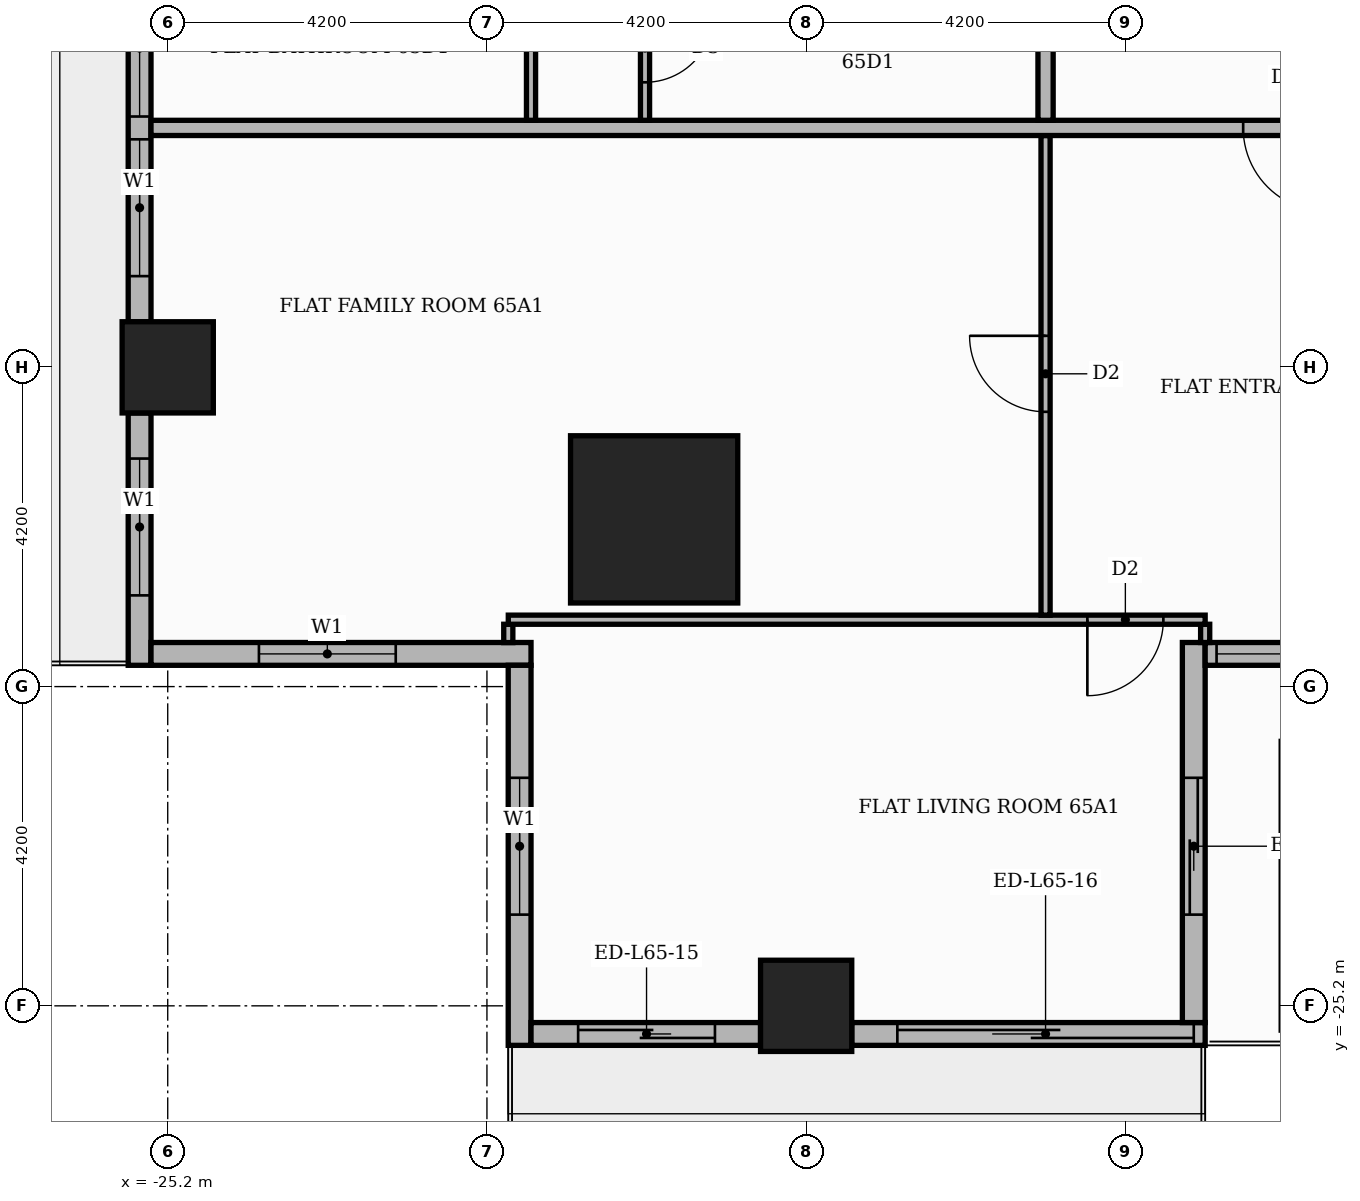
"""IFC4 building model, lengths in metres.
Left out: names, types, materials, properties, quantities, classifications, styles, units other than length and angle.
Written with IfcOpenShell. Run it as: python <this file> out.ifc"""

import sys

from ifc_helpers import new_model, si_unit, direction, frame, frame_2d, origin, origin_2d, place, context, subcontext, project, spatial, rectangle, extrude, element, fill, save


model = new_model("IFC4")
c1 = context("Model", 3, precision=1e-05, world=origin(), true_north=direction((0.0, 1.0)))
c2 = subcontext(c1, "Body", "Model", "MODEL_VIEW")
j1 = project(units=[si_unit("LENGTHUNIT", "METRE"), si_unit("PLANEANGLEUNIT", "RADIAN")], contexts=[c1])
p1 = place(None, origin())
s1 = spatial("IfcSite", under=j1, at=p1, CompositionType="ELEMENT")
p2 = place(p1, origin())
s2 = spatial("IfcBuilding", under=s1, at=p2, CompositionType="ELEMENT")
p3 = place(p2, frame((0.0, 0.0, 271.8)))
s3 = spatial("IfcBuildingStorey", under=s2, at=p3, CompositionType="ELEMENT", Elevation=271.8)
p4 = place(p3, frame((-18.8, -18.8, 0.0), z_axis=(0.0, 0.0, 1.0), x_axis=(1.0, 0.0, 0.0)))
e1 = element("IfcColumn", 1, at=p4, inside=s3, PredefinedType="COLUMN", context=c2, shape_type="SweptSolid", body=[
    extrude(rectangle(XDim=2.2, YDim=2.2, at=origin_2d()), origin(), (0.0, 0.0, 1.0), 3.9),
])
for number, where, z_axis, x_axis in (
    (2, (-16.8, -25.2, 0.0), (0.0, 0.0, 1.0), (1.0, 0.0, 0.0)),
    (3, (-25.2, -16.8, 0.0), (0.0, 0.0, 1.0), (1.0, 0.0, 0.0)),
):
    element("IfcColumn", number, at=place(p3, frame(where, z_axis=z_axis, x_axis=x_axis)), inside=s3, PredefinedType="COLUMN", context=c2, shape_type="SweptSolid", body=[
        extrude(rectangle(XDim=1.2, YDim=1.2, at=origin_2d()), origin(), (0.0, 0.0, 1.0), 3.9),
    ])
p5 = place(p3, frame((-25.57, -9.0, 0.0), z_axis=(0.0, 0.0, 1.0), x_axis=(0.0, -1.0, 0.0)))
e4 = element("IfcWall", 4, at=p5, inside=s3, PredefinedType="STANDARD", context=c2, shape_type="SweptSolid", body=[
    extrude(rectangle(XDim=7.2, YDim=0.3, at=frame_2d((3.6, 0.0))), origin(), (0.0, 0.0, 1.0), 3.48),
])
p6 = place(p5, frame((0.6, 0.0, 0.9)))
e5 = element("IfcOpeningElement", 5, at=p6, cuts=e4, PredefinedType="OPENING", context=c2, shape_type="SweptSolid", body=[
    extrude(rectangle(XDim=1.8, YDim=2.1, at=frame_2d((0.9, 1.05))), frame((0.0, 0.16, 0.0), z_axis=(0.0, -1.0, 0.0), x_axis=(1.0, 0.0, 0.0)), (0.0, 0.0, 1.0), 0.32),
])
p7 = place(p5, frame((2.7, 0.0, 0.9)))
e6 = element("IfcOpeningElement", 6, at=p7, cuts=e4, PredefinedType="OPENING", context=c2, shape_type="SweptSolid", body=[
    extrude(rectangle(XDim=1.8, YDim=2.1, at=frame_2d((0.9, 1.05))), frame((0.0, 0.16, 0.0), z_axis=(0.0, -1.0, 0.0), x_axis=(1.0, 0.0, 0.0)), (0.0, 0.0, 1.0), 0.32),
])
p8 = place(p5, frame((4.8, 0.0, 0.9)))
e7 = element("IfcOpeningElement", 7, at=p8, cuts=e4, PredefinedType="OPENING", context=c2, shape_type="SweptSolid", body=[
    extrude(rectangle(XDim=1.8, YDim=2.1, at=frame_2d((0.9, 1.05))), frame((0.0, 0.16, 0.0), z_axis=(0.0, -1.0, 0.0), x_axis=(1.0, 0.0, 0.0)), (0.0, 0.0, 1.0), 0.32),
])
p9 = place(p3, frame((-25.57, -17.4, 0.0), z_axis=(0.0, 0.0, 1.0), x_axis=(0.0, -1.0, 0.0)))
e8 = element("IfcWall", 8, at=p9, inside=s3, PredefinedType="STANDARD", context=c2, shape_type="SweptSolid", body=[
    extrude(rectangle(XDim=3.32, YDim=0.3, at=frame_2d((1.66, 0.0))), origin(), (0.0, 0.0, 1.0), 3.48),
])
p10 = place(p9, frame((0.6, 0.0, 0.9)))
e9 = element("IfcOpeningElement", 9, at=p10, cuts=e8, PredefinedType="OPENING", context=c2, shape_type="SweptSolid", body=[
    extrude(rectangle(XDim=1.8, YDim=2.1, at=frame_2d((0.9, 1.05))), frame((0.0, 0.16, 0.0), z_axis=(0.0, -1.0, 0.0), x_axis=(1.0, 0.0, 0.0)), (0.0, 0.0, 1.0), 0.32),
])
p11 = place(p3, frame((-25.42, -20.57, 0.0), z_axis=(0.0, 0.0, 1.0), x_axis=(1.0, 0.0, 0.0)))
e10 = element("IfcWall", 10, at=p11, inside=s3, PredefinedType="STANDARD", context=c2, shape_type="SweptSolid", body=[
    extrude(rectangle(XDim=5.0, YDim=0.3, at=frame_2d((2.5, 0.0))), origin(), (0.0, 0.0, 1.0), 3.48),
])
p12 = place(p11, frame((1.42, 0.0, 0.9)))
e11 = element("IfcOpeningElement", 11, at=p12, cuts=e10, PredefinedType="OPENING", context=c2, shape_type="SweptSolid", body=[
    extrude(rectangle(XDim=1.8, YDim=2.1, at=frame_2d((0.9, 1.05))), frame((0.0, 0.16, 0.0), z_axis=(0.0, -1.0, 0.0), x_axis=(1.0, 0.0, 0.0)), (0.0, 0.0, 1.0), 0.32),
])
p13 = place(p3, frame((-20.57, -20.72, 0.0), z_axis=(0.0, 0.0, 1.0), x_axis=(0.0, -1.0, 0.0)))
e12 = element("IfcWall", 12, at=p13, inside=s3, PredefinedType="STANDARD", context=c2, shape_type="SweptSolid", body=[
    extrude(rectangle(XDim=5.0, YDim=0.3, at=frame_2d((2.5, 0.0))), origin(), (0.0, 0.0, 1.0), 3.48),
])
p14 = place(p13, frame((1.48, 0.0, 0.9)))
e13 = element("IfcOpeningElement", 13, at=p14, cuts=e12, PredefinedType="OPENING", context=c2, shape_type="SweptSolid", body=[
    extrude(rectangle(XDim=1.8, YDim=2.1, at=frame_2d((0.9, 1.05))), frame((0.0, 0.16, 0.0), z_axis=(0.0, -1.0, 0.0), x_axis=(1.0, 0.0, 0.0)), (0.0, 0.0, 1.0), 0.32),
])
p15 = place(p3, frame((-20.42, -25.57, 0.0), z_axis=(0.0, 0.0, 1.0), x_axis=(1.0, 0.0, 0.0)))
e14 = element("IfcWall", 14, at=p15, inside=s3, PredefinedType="STANDARD", context=c2, shape_type="SweptSolid", body=[
    extrude(rectangle(XDim=3.02, YDim=0.3, at=frame_2d((1.51, 0.0))), origin(), (0.0, 0.0, 1.0), 3.48),
])
p16 = place(p15, frame((0.62, 0.0, 0.0)))
e15 = element("IfcOpeningElement", 15, at=p16, cuts=e14, PredefinedType="OPENING", context=c2, shape_type="SweptSolid", body=[
    extrude(rectangle(XDim=1.8, YDim=2.4, at=frame_2d((0.9, 1.2))), frame((0.0, 0.16, 0.0), z_axis=(0.0, -1.0, 0.0), x_axis=(1.0, 0.0, 0.0)), (0.0, 0.0, 1.0), 0.32),
])
p17 = place(p3, frame((-16.2, -25.57, 0.0), z_axis=(0.0, 0.0, 1.0), x_axis=(1.0, 0.0, 0.0)))
e16 = element("IfcWall", 16, at=p17, inside=s3, PredefinedType="STANDARD", context=c2, shape_type="SweptSolid", body=[
    extrude(rectangle(XDim=4.65, YDim=0.3, at=frame_2d((2.325, 0.0))), origin(), (0.0, 0.0, 1.0), 3.48),
])
p18 = place(p17, frame((0.6, 0.0, 0.0)))
e17 = element("IfcOpeningElement", 17, at=p18, cuts=e16, PredefinedType="OPENING", context=c2, shape_type="SweptSolid", body=[
    extrude(rectangle(XDim=3.9, YDim=2.4, at=frame_2d((1.95, 1.2))), frame((0.0, 0.16, 0.0), z_axis=(0.0, -1.0, 0.0), x_axis=(1.0, 0.0, 0.0)), (0.0, 0.0, 1.0), 0.32),
])
p19 = place(p3, frame((-11.7, -25.42, 0.0), z_axis=(0.0, 0.0, 1.0), x_axis=(0.0, 1.0, 0.0)))
e18 = element("IfcWall", 18, at=p19, inside=s3, PredefinedType="STANDARD", context=c2, shape_type="SweptSolid", body=[
    extrude(rectangle(XDim=5.0, YDim=0.3, at=frame_2d((2.5, 0.0))), origin(), (0.0, 0.0, 1.0), 3.48),
])
p20 = place(p19, frame((1.42, 0.0, 0.0)))
e19 = element("IfcOpeningElement", 19, at=p20, cuts=e18, PredefinedType="OPENING", context=c2, shape_type="SweptSolid", body=[
    extrude(rectangle(XDim=1.8, YDim=2.4, at=frame_2d((0.9, 1.2))), frame((0.0, 0.16, 0.0), z_axis=(0.0, -1.0, 0.0), x_axis=(1.0, 0.0, 0.0)), (0.0, 0.0, 1.0), 0.32),
])
p21 = place(p3, frame((-11.55, -20.57, 0.0), z_axis=(0.0, 0.0, 1.0), x_axis=(1.0, 0.0, 0.0)))
e20 = element("IfcWall", 20, at=p21, inside=s3, PredefinedType="STANDARD", context=c2, shape_type="SweptSolid", body=[
    extrude(rectangle(XDim=23.4, YDim=0.3, at=frame_2d((11.7, 0.0))), origin(), (0.0, 0.0, 1.0), 3.48),
])
p22 = place(p21, frame((0.15, 0.0, 0.9)))
e21 = element("IfcOpeningElement", 21, at=p22, cuts=e20, PredefinedType="OPENING", context=c2, shape_type="SweptSolid", body=[
    extrude(rectangle(XDim=6.0, YDim=2.1, at=frame_2d((3.0, 1.05))), frame((0.0, 0.16, 0.0), z_axis=(0.0, -1.0, 0.0), x_axis=(1.0, 0.0, 0.0)), (0.0, 0.0, 1.0), 0.32),
])
p23 = place(p21, frame((6.45, 0.0, 0.9)))
e22 = element("IfcOpeningElement", 22, at=p23, cuts=e20, PredefinedType="OPENING", context=c2, shape_type="SweptSolid", body=[
    extrude(rectangle(XDim=6.0, YDim=2.1, at=frame_2d((3.0, 1.05))), frame((0.0, 0.16, 0.0), z_axis=(0.0, -1.0, 0.0), x_axis=(1.0, 0.0, 0.0)), (0.0, 0.0, 1.0), 0.32),
])
p24 = place(p21, frame((12.75, 0.0, 0.9)))
e23 = element("IfcOpeningElement", 23, at=p24, cuts=e20, PredefinedType="OPENING", context=c2, shape_type="SweptSolid", body=[
    extrude(rectangle(XDim=6.0, YDim=2.1, at=frame_2d((3.0, 1.05))), frame((0.0, 0.16, 0.0), z_axis=(0.0, -1.0, 0.0), x_axis=(1.0, 0.0, 0.0)), (0.0, 0.0, 1.0), 0.32),
])
p25 = place(p21, frame((19.05, 0.0, 0.9)))
e24 = element("IfcOpeningElement", 24, at=p25, cuts=e20, PredefinedType="OPENING", context=c2, shape_type="SweptSolid", body=[
    extrude(rectangle(XDim=3.9, YDim=2.1, at=frame_2d((1.95, 1.05))), frame((0.0, 0.16, 0.0), z_axis=(0.0, -1.0, 0.0), x_axis=(1.0, 0.0, 0.0)), (0.0, 0.0, 1.0), 0.32),
])
p26 = place(p3, frame((-20.719, -20.421, 0.0), z_axis=(0.0, 0.0, 1.0), x_axis=(0.0, 1.0, 0.0)))
e25 = element("IfcWall", 25, at=p26, inside=s3, PredefinedType="PARTITIONING", context=c2, shape_type="SweptSolid", body=[
    extrude(rectangle(XDim=0.241, YDim=0.12, at=frame_2d((0.121, 0.0))), origin(), (0.0, 0.0, 1.0), 3.48),
])
p27 = place(p3, frame((-11.55, -20.42, 0.0), z_axis=(0.0, 0.0, 1.0), x_axis=(0.0, 1.0, 0.0)))
e26 = element("IfcWall", 26, at=p27, inside=s3, PredefinedType="PARTITIONING", context=c2, shape_type="SweptSolid", body=[
    extrude(rectangle(XDim=0.24, YDim=0.12, at=frame_2d((0.12, 0.0))), origin(), (0.0, 0.0, 1.0), 3.48),
])
p28 = place(p3, frame((-20.719, -20.12, 0.0), z_axis=(0.0, 0.0, 1.0), x_axis=(1.0, 0.0, 0.0)))
e27 = element("IfcWall", 27, at=p28, inside=s3, PredefinedType="PARTITIONING", context=c2, shape_type="SweptSolid", body=[
    extrude(rectangle(XDim=9.169, YDim=0.12, at=frame_2d((4.584, 0.0))), origin(), (0.0, 0.0, 1.0), 3.48),
])
p29 = place(p28, frame((7.619, 0.0, 0.0)))
e28 = element("IfcOpeningElement", 28, at=p29, cuts=e27, PredefinedType="OPENING", context=c2, shape_type="SweptSolid", body=[
    extrude(rectangle(XDim=1.0, YDim=2.1, at=frame_2d((0.5, 1.05))), frame((0.0, 0.07, 0.0), z_axis=(0.0, -1.0, 0.0), x_axis=(1.0, 0.0, 0.0)), (0.0, 0.0, 1.0), 0.14),
])
p30 = place(p3, frame((-13.65, -20.06, 0.0), z_axis=(0.0, 0.0, 1.0), x_axis=(0.0, 1.0, 0.0)))
e29 = element("IfcWall", 29, at=p30, inside=s3, PredefinedType="PARTITIONING", context=c2, shape_type="SweptSolid", body=[
    extrude(rectangle(XDim=6.31, YDim=0.12, at=frame_2d((3.155, 0.0))), origin(), (0.0, 0.0, 1.0), 3.48),
])
p31 = place(p30, frame((2.675, 0.0, 0.0)))
e30 = element("IfcOpeningElement", 30, at=p31, cuts=e29, PredefinedType="OPENING", context=c2, shape_type="SweptSolid", body=[
    extrude(rectangle(XDim=1.0, YDim=2.1, at=frame_2d((0.5, 1.05))), frame((0.0, 0.07, 0.0), z_axis=(0.0, -1.0, 0.0), x_axis=(1.0, 0.0, 0.0)), (0.0, 0.0, 1.0), 0.14),
])
p32 = place(p3, frame((-25.42, -13.65, 0.0), z_axis=(0.0, 0.0, 1.0), x_axis=(1.0, 0.0, 0.0)))
e31 = element("IfcWall", 31, at=p32, inside=s3, PredefinedType="PARTITIONING", context=c2, shape_type="SweptSolid", body=[
    extrude(rectangle(XDim=39.07, YDim=0.2, at=frame_2d((19.535, 0.0))), origin(), (0.0, 0.0, 1.0), 3.48),
])
p33 = place(p32, frame((14.37, 0.0, 0.0)))
e32 = element("IfcOpeningElement", 32, at=p33, cuts=e31, PredefinedType="OPENING", context=c2, shape_type="SweptSolid", body=[
    extrude(rectangle(XDim=1.1, YDim=2.4, at=frame_2d((0.55, 1.2))), frame((0.0, 0.11, 0.0), z_axis=(0.0, -1.0, 0.0), x_axis=(1.0, 0.0, 0.0)), (0.0, 0.0, 1.0), 0.22),
])
p34 = place(p3, frame((-20.42, -13.55, 0.0), z_axis=(0.0, 0.0, 1.0), x_axis=(0.0, 1.0, 0.0)))
e33 = element("IfcWall", 33, at=p34, inside=s3, PredefinedType="PARTITIONING", context=c2, shape_type="SweptSolid", body=[
    extrude(rectangle(XDim=1.94, YDim=0.12, at=frame_2d((0.97, 0.0))), origin(), (0.0, 0.0, 1.0), 3.48),
])
p35 = place(p3, frame((-18.92, -13.55, 0.0), z_axis=(0.0, 0.0, 1.0), x_axis=(0.0, 1.0, 0.0)))
e34 = element("IfcWall", 34, at=p35, inside=s3, PredefinedType="PARTITIONING", context=c2, shape_type="SweptSolid", body=[
    extrude(rectangle(XDim=1.94, YDim=0.12, at=frame_2d((0.97, 0.0))), origin(), (0.0, 0.0, 1.0), 3.48),
])
p36 = place(p35, frame((0.5, 0.0, 0.0)))
e35 = element("IfcOpeningElement", 35, at=p36, cuts=e34, PredefinedType="OPENING", context=c2, shape_type="SweptSolid", body=[
    extrude(rectangle(XDim=0.9, YDim=2.1, at=frame_2d((0.45, 1.05))), frame((0.0, 0.07, 0.0), z_axis=(0.0, -1.0, 0.0), x_axis=(1.0, 0.0, 0.0)), (0.0, 0.0, 1.0), 0.14),
])
p37 = place(p3, frame((-13.65, -13.55, 0.0), z_axis=(0.0, 0.0, 1.0), x_axis=(0.0, 1.0, 0.0)))
e36 = element("IfcWall", 36, at=p37, inside=s3, PredefinedType="PARTITIONING", context=c2, shape_type="SweptSolid", body=[
    extrude(rectangle(XDim=2.45, YDim=0.2, at=frame_2d((1.225, 0.0))), origin(), (0.0, 0.0, 1.0), 3.48),
])
p38 = place(p7, origin())
e37 = element("IfcWindow", 37, at=p38, inside=s3, PartitioningType="SINGLE_PANEL", PredefinedType="WINDOW", context=c2, shape_type="SweptSolid", body=[
    extrude(rectangle(XDim=1.8, YDim=2.1, at=frame_2d((0.9, 1.05))), frame((0.0, 0.03, 0.0), z_axis=(0.0, -1.0, 0.0), x_axis=(1.0, 0.0, 0.0)), (0.0, 0.0, 1.0), 0.06),
])
fill(e6, e37)
p39 = place(p8, origin())
e38 = element("IfcWindow", 38, at=p39, inside=s3, PartitioningType="SINGLE_PANEL", PredefinedType="WINDOW", context=c2, shape_type="SweptSolid", body=[
    extrude(rectangle(XDim=1.8, YDim=2.1, at=frame_2d((0.9, 1.05))), frame((0.0, 0.03, 0.0), z_axis=(0.0, -1.0, 0.0), x_axis=(1.0, 0.0, 0.0)), (0.0, 0.0, 1.0), 0.06),
])
fill(e7, e38)
p40 = place(p10, origin())
e39 = element("IfcWindow", 39, at=p40, inside=s3, PartitioningType="SINGLE_PANEL", PredefinedType="WINDOW", context=c2, shape_type="SweptSolid", body=[
    extrude(rectangle(XDim=1.8, YDim=2.1, at=frame_2d((0.9, 1.05))), frame((0.0, 0.03, 0.0), z_axis=(0.0, -1.0, 0.0), x_axis=(1.0, 0.0, 0.0)), (0.0, 0.0, 1.0), 0.06),
])
fill(e9, e39)
p41 = place(p12, origin())
e40 = element("IfcWindow", 40, at=p41, inside=s3, PartitioningType="SINGLE_PANEL", PredefinedType="WINDOW", context=c2, shape_type="SweptSolid", body=[
    extrude(rectangle(XDim=1.8, YDim=2.1, at=frame_2d((0.9, 1.05))), frame((0.0, 0.03, 0.0), z_axis=(0.0, -1.0, 0.0), x_axis=(1.0, 0.0, 0.0)), (0.0, 0.0, 1.0), 0.06),
])
fill(e11, e40)
p42 = place(p14, origin())
e41 = element("IfcWindow", 41, at=p42, inside=s3, PartitioningType="SINGLE_PANEL", PredefinedType="WINDOW", context=c2, shape_type="SweptSolid", body=[
    extrude(rectangle(XDim=1.8, YDim=2.1, at=frame_2d((0.9, 1.05))), frame((0.0, 0.03, 0.0), z_axis=(0.0, -1.0, 0.0), x_axis=(1.0, 0.0, 0.0)), (0.0, 0.0, 1.0), 0.06),
])
fill(e13, e41)
p43 = place(p16, origin())
e42 = element("IfcDoor", 42, at=p43, inside=s3, OperationType="SLIDING_TO_RIGHT", PredefinedType="DOOR", context=c2, shape_type="SweptSolid", body=[
    extrude(rectangle(XDim=1.8, YDim=2.4, at=frame_2d((0.9, 1.2))), frame((0.0, 0.025, 0.0), z_axis=(0.0, -1.0, 0.0), x_axis=(1.0, 0.0, 0.0)), (0.0, 0.0, 1.0), 0.05),
])
fill(e15, e42)
p44 = place(p18, origin())
e43 = element("IfcDoor", 43, at=p44, inside=s3, OperationType="SLIDING_TO_LEFT", PredefinedType="DOOR", context=c2, shape_type="SweptSolid", body=[
    extrude(rectangle(XDim=3.9, YDim=2.4, at=frame_2d((1.95, 1.2))), frame((0.0, 0.025, 0.0), z_axis=(0.0, -1.0, 0.0), x_axis=(1.0, 0.0, 0.0)), (0.0, 0.0, 1.0), 0.05),
])
fill(e17, e43)
p45 = place(p20, origin())
e44 = element("IfcDoor", 44, at=p45, inside=s3, OperationType="SLIDING_TO_LEFT", PredefinedType="DOOR", context=c2, shape_type="SweptSolid", body=[
    extrude(rectangle(XDim=1.8, YDim=2.4, at=frame_2d((0.9, 1.2))), frame((0.0, 0.025, 0.0), z_axis=(0.0, -1.0, 0.0), x_axis=(1.0, 0.0, 0.0)), (0.0, 0.0, 1.0), 0.05),
])
fill(e19, e44)
p46 = place(p22, origin())
e45 = element("IfcWindow", 45, at=p46, inside=s3, PartitioningType="SINGLE_PANEL", PredefinedType="WINDOW", context=c2, shape_type="SweptSolid", body=[
    extrude(rectangle(XDim=6.0, YDim=2.1, at=frame_2d((3.0, 1.05))), frame((0.0, 0.03, 0.0), z_axis=(0.0, -1.0, 0.0), x_axis=(1.0, 0.0, 0.0)), (0.0, 0.0, 1.0), 0.06),
])
fill(e21, e45)
p47 = place(p33, frame((1.1, 0.0, 0.0), z_axis=(0.0, 0.0, 1.0), x_axis=(-1.0, 0.0, 0.0)))
e46 = element("IfcDoor", 46, at=p47, inside=s3, OperationType="SINGLE_SWING_RIGHT", PredefinedType="DOOR", context=c2, shape_type="SweptSolid", body=[
    extrude(rectangle(XDim=1.1, YDim=2.4, at=frame_2d((0.55, 1.2))), frame((0.0, 0.025, 0.0), z_axis=(0.0, -1.0, 0.0), x_axis=(1.0, 0.0, 0.0)), (0.0, 0.0, 1.0), 0.05),
])
fill(e32, e46)
p48 = place(p31, origin())
e47 = element("IfcDoor", 47, at=p48, inside=s3, OperationType="SINGLE_SWING_RIGHT", PredefinedType="DOOR", context=c2, shape_type="SweptSolid", body=[
    extrude(rectangle(XDim=1.0, YDim=2.1, at=frame_2d((0.5, 1.05))), frame((0.0, 0.025, 0.0), z_axis=(0.0, -1.0, 0.0), x_axis=(1.0, 0.0, 0.0)), (0.0, 0.0, 1.0), 0.05),
])
fill(e30, e47)
p49 = place(p29, frame((1.0, 0.0, 0.0), z_axis=(0.0, 0.0, 1.0), x_axis=(-1.0, 0.0, 0.0)))
e48 = element("IfcDoor", 48, at=p49, inside=s3, OperationType="SINGLE_SWING_LEFT", PredefinedType="DOOR", context=c2, shape_type="SweptSolid", body=[
    extrude(rectangle(XDim=1.0, YDim=2.1, at=frame_2d((0.5, 1.05))), frame((0.0, 0.025, 0.0), z_axis=(0.0, -1.0, 0.0), x_axis=(1.0, 0.0, 0.0)), (0.0, 0.0, 1.0), 0.05),
])
fill(e28, e48)
p50 = place(p36, frame((0.9, 0.0, 0.0), z_axis=(0.0, 0.0, 1.0), x_axis=(-1.0, 0.0, 0.0)))
e49 = element("IfcDoor", 49, at=p50, inside=s3, OperationType="SINGLE_SWING_RIGHT", PredefinedType="DOOR", context=c2, shape_type="SweptSolid", body=[
    extrude(rectangle(XDim=0.9, YDim=2.1, at=frame_2d((0.45, 1.05))), frame((0.0, 0.025, 0.0), z_axis=(0.0, -1.0, 0.0), x_axis=(1.0, 0.0, 0.0)), (0.0, 0.0, 1.0), 0.05),
])
fill(e35, e49)
save(model, sys.argv[1])
